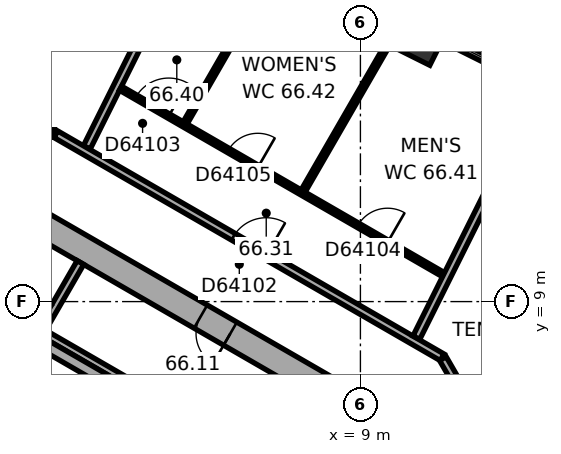
"""IFC4 building model, lengths in metres.
Left out: names, types, materials, properties, quantities, classifications, styles, units other than length and angle.
Written with IfcOpenShell. Run it as: python <this file> out.ifc"""

import sys

from ifc_helpers import new_model, si_unit, direction, frame, frame_2d, origin, origin_2d, place, context, subcontext, project, spatial, rectangle, extrude, element, fill, save


model = new_model("IFC4")
c1 = context("Model", 3, precision=1e-05, world=origin(), true_north=direction((0.0, 1.0)))
c2 = subcontext(c1, "Body", "Model", "MODEL_VIEW")
j1 = project(units=[si_unit("LENGTHUNIT", "METRE"), si_unit("PLANEANGLEUNIT", "RADIAN")], contexts=[c1])
p1 = place(None, origin())
s1 = spatial("IfcSite", under=j1, at=p1, CompositionType="ELEMENT")
p2 = place(p1, origin())
s2 = spatial("IfcBuilding", under=s1, at=p2, CompositionType="ELEMENT")
p3 = place(p2, frame((0.0, 0.0, 267.2)))
s3 = spatial("IfcBuildingStorey", under=s2, at=p3, CompositionType="ELEMENT", Elevation=267.2)
p4 = place(p3, frame((10.58, 15.732, 0.0), z_axis=(0.0, 0.0, 1.0), x_axis=(-0.894934361602, 0.44619781311, 0.0)))
e1 = element("IfcColumn", 1, at=p4, inside=s3, PredefinedType="COLUMN", context=c2, shape_type="SweptSolid", body=[
    extrude(rectangle(XDim=0.9, YDim=0.7, at=origin_2d()), origin(), (0.0, 0.0, 1.0), 3.7),
])
p5 = place(p3, frame((10.025, 5.586, 0.0), z_axis=(0.0, 0.0, 1.0), x_axis=(-0.866026453023, 0.499998182661, 0.0)))
e2 = element("IfcWall", 2, at=p5, inside=s3, PredefinedType="SHEAR", context=c2, shape_type="SweptSolid", body=[
    extrude(rectangle(XDim=11.778, YDim=0.7, at=frame_2d((5.889, 0.0))), origin(), (0.0, 0.0, 1.0), 3.7),
])
p6 = place(p5, frame((5.139, 0.0, 0.0)))
e3 = element("IfcOpeningElement", 3, at=p6, cuts=e2, PredefinedType="OPENING", context=c2, shape_type="SweptSolid", body=[
    extrude(rectangle(XDim=0.9, YDim=2.1, at=frame_2d((0.45, 1.05))), frame((0.0, 0.36, 0.0), z_axis=(0.0, -1.0, 0.0), x_axis=(1.0, 0.0, 0.0)), (0.0, 0.0, 1.0), 0.72),
])
p7 = place(p3, frame((17.223, 12.923, 0.0), z_axis=(0.0, 0.0, 1.0), x_axis=(-0.894930561148, 0.44620543556, 0.0)))
e4 = element("IfcWall", 4, at=p7, inside=s3, PredefinedType="STANDARD", context=c2, shape_type="SweptSolid", body=[
    extrude(rectangle(XDim=17.731, YDim=0.2, at=frame_2d((8.866, 0.0))), origin(), (0.0, 0.0, 1.0), 3.7),
])
p8 = place(p7, frame((1.202, 0.0, 0.9)))
e5 = element("IfcOpeningElement", 5, at=p8, cuts=e4, PredefinedType="OPENING", context=c2, shape_type="SweptSolid", body=[
    extrude(rectangle(XDim=2.0, YDim=2.0, at=frame_2d((1.0, 1.0))), frame((0.0, 0.11, 0.0), z_axis=(0.0, -1.0, 0.0), x_axis=(1.0, 0.0, 0.0)), (0.0, 0.0, 1.0), 0.22),
])
p9 = place(p7, frame((4.533, 0.0, 0.9)))
e6 = element("IfcOpeningElement", 6, at=p9, cuts=e4, PredefinedType="OPENING", context=c2, shape_type="SweptSolid", body=[
    extrude(rectangle(XDim=2.0, YDim=2.0, at=frame_2d((1.0, 1.0))), frame((0.0, 0.11, 0.0), z_axis=(0.0, -1.0, 0.0), x_axis=(1.0, 0.0, 0.0)), (0.0, 0.0, 1.0), 0.22),
])
p10 = place(p7, frame((7.865, 0.0, 0.9)))
e7 = element("IfcOpeningElement", 7, at=p10, cuts=e4, PredefinedType="OPENING", context=c2, shape_type="SweptSolid", body=[
    extrude(rectangle(XDim=2.0, YDim=2.0, at=frame_2d((1.0, 1.0))), frame((0.0, 0.11, 0.0), z_axis=(0.0, -1.0, 0.0), x_axis=(1.0, 0.0, 0.0)), (0.0, 0.0, 1.0), 0.22),
])
p11 = place(p7, frame((11.197, 0.0, 0.9)))
e8 = element("IfcOpeningElement", 8, at=p11, cuts=e4, PredefinedType="OPENING", context=c2, shape_type="SweptSolid", body=[
    extrude(rectangle(XDim=2.0, YDim=2.0, at=frame_2d((1.0, 1.0))), frame((0.0, 0.11, 0.0), z_axis=(0.0, -1.0, 0.0), x_axis=(1.0, 0.0, 0.0)), (0.0, 0.0, 1.0), 0.22),
])
p12 = place(p7, frame((14.528, 0.0, 0.9)))
e9 = element("IfcOpeningElement", 9, at=p12, cuts=e4, PredefinedType="OPENING", context=c2, shape_type="SweptSolid", body=[
    extrude(rectangle(XDim=2.0, YDim=2.0, at=frame_2d((1.0, 1.0))), frame((0.0, 0.11, 0.0), z_axis=(0.0, -1.0, 0.0), x_axis=(1.0, 0.0, 0.0)), (0.0, 0.0, 1.0), 0.22),
])
p13 = place(p3, frame((7.424, 4.259, 0.0), z_axis=(0.0, 0.0, 1.0), x_axis=(-0.866026010844, 0.49999894854, 0.0)))
e10 = element("IfcWall", 10, at=p13, inside=s3, PredefinedType="PARTITIONING", context=c2, shape_type="SweptSolid", body=[
    extrude(rectangle(XDim=8.0, YDim=0.2, at=frame_2d((4.0, 0.0))), origin(), (0.0, 0.0, 1.0), 3.42),
])
p14 = place(p3, frame((0.532, 8.122, 0.0), z_axis=(0.0, 0.0, 1.0), x_axis=(0.500077893725, 0.86598042715, 0.0)))
e11 = element("IfcWall", 11, at=p14, inside=s3, PredefinedType="PARTITIONING", context=c2, shape_type="SweptSolid", body=[
    extrude(rectangle(XDim=2.2, YDim=0.2, at=frame_2d((1.1, 0.0))), origin(), (0.0, 0.0, 1.0), 3.42),
])
p15 = place(p3, frame((6.303, 4.617, 0.0), z_axis=(0.0, 0.0, 1.0), x_axis=(-0.866027801685, 0.499995846692, 0.0)))
e12 = element("IfcWall", 12, at=p15, inside=s3, PredefinedType="SHEAR", context=c2, shape_type="SweptSolid", body=[
    extrude(rectangle(XDim=7.06, YDim=0.3, at=frame_2d((3.53, 0.0))), origin(), (0.0, 0.0, 1.0), 3.42),
])
p16 = place(p3, frame((0.95, 13.423, 0.0), z_axis=(0.0, 0.0, 1.0), x_axis=(-1.0, 0.0, 0.0)))
e13 = element("IfcWall", 13, at=p16, inside=s3, PredefinedType="PARTITIONING", context=c2, shape_type="SweptSolid", body=[
    extrude(rectangle(XDim=1.86, YDim=0.2, at=frame_2d((0.93, 0.0))), origin(), (0.0, 0.0, 1.0), 3.42),
])
p17 = place(p3, frame((4.388, 13.702, 0.0), z_axis=(0.0, 0.0, 1.0), x_axis=(0.500048966069, 0.865997131366, 0.0)))
e14 = element("IfcWall", 14, at=p17, inside=s3, PredefinedType="PARTITIONING", context=c2, shape_type="SweptSolid", body=[
    extrude(rectangle(XDim=2.74, YDim=0.12, at=frame_2d((1.37, 0.0))), origin(), (0.0, 0.0, 1.0), 3.42),
])
p18 = place(p3, frame((4.46, 18.392, 0.0), z_axis=(0.0, 0.0, 1.0), x_axis=(-0.446197360024, -0.894934587502, 0.0)))
e15 = element("IfcWall", 15, at=p18, inside=s3, PredefinedType="PARTITIONING", context=c2, shape_type="SweptSolid", body=[
    extrude(rectangle(XDim=5.96, YDim=0.2, at=frame_2d((2.98, 0.0))), origin(), (0.0, 0.0, 1.0), 2.87),
])
p19 = place(p3, frame((10.072, 16.376, 0.0), z_axis=(0.0, 0.0, 1.0), x_axis=(-0.499972385701, -0.86604134632, 0.0)))
e16 = element("IfcWall", 16, at=p19, inside=s3, PredefinedType="PARTITIONING", context=c2, shape_type="SweptSolid", body=[
    extrude(rectangle(XDim=5.158, YDim=0.12, at=frame_2d((2.579, 0.0))), origin(), (0.0, 0.0, 1.0), 2.87),
])
p20 = place(p3, frame((11.15, 7.534, 0.0), z_axis=(0.0, 0.0, 1.0), x_axis=(-0.866026603062, 0.499997922785, 0.0)))
e17 = element("IfcWall", 17, at=p20, inside=s3, PredefinedType="PARTITIONING", context=c2, shape_type="SweptSolid", body=[
    extrude(rectangle(XDim=11.738, YDim=0.2, at=frame_2d((5.869, 0.0))), origin(), (0.0, 0.0, 1.0), 3.42),
])
p21 = place(p20, frame((5.345, 0.0, 0.0)))
e18 = element("IfcOpeningElement", 18, at=p21, cuts=e17, PredefinedType="OPENING", context=c2, shape_type="SweptSolid", body=[
    extrude(rectangle(XDim=1.0, YDim=2.1, at=frame_2d((0.5, 1.05))), frame((0.0, 0.11, 0.0), z_axis=(0.0, -1.0, 0.0), x_axis=(1.0, 0.0, 0.0)), (0.0, 0.0, 1.0), 0.22),
])
p22 = place(p3, frame((11.187, 9.707, 0.0), z_axis=(0.0, 0.0, 1.0), x_axis=(-0.866033133531, 0.499986611447, 0.0)))
e19 = element("IfcWall", 19, at=p22, inside=s3, PredefinedType="PARTITIONING", context=c2, shape_type="SweptSolid", body=[
    extrude(rectangle(XDim=9.814, YDim=0.12, at=frame_2d((4.907, 0.0))), origin(), (0.0, 0.0, 1.0), 3.42),
])
p23 = place(p22, frame((8.349, 0.0, 0.0)))
e20 = element("IfcOpeningElement", 20, at=p23, cuts=e19, PredefinedType="OPENING", context=c2, shape_type="SweptSolid", body=[
    extrude(rectangle(XDim=1.0, YDim=2.1, at=frame_2d((0.5, 1.05))), frame((0.0, 0.07, 0.0), z_axis=(0.0, -1.0, 0.0), x_axis=(1.0, 0.0, 0.0)), (0.0, 0.0, 1.0), 0.14),
])
p24 = place(p22, frame((1.7, 0.0, 0.0)))
e21 = element("IfcOpeningElement", 21, at=p24, cuts=e19, PredefinedType="OPENING", context=c2, shape_type="SweptSolid", body=[
    extrude(rectangle(XDim=0.9, YDim=2.1, at=frame_2d((0.45, 1.05))), frame((0.0, 0.07, 0.0), z_axis=(0.0, -1.0, 0.0), x_axis=(1.0, 0.0, 0.0)), (0.0, 0.0, 1.0), 0.14),
])
p25 = place(p22, frame((5.642, 0.0, 0.0)))
e22 = element("IfcOpeningElement", 22, at=p25, cuts=e19, PredefinedType="OPENING", context=c2, shape_type="SweptSolid", body=[
    extrude(rectangle(XDim=0.9, YDim=2.1, at=frame_2d((0.45, 1.05))), frame((0.0, 0.07, 0.0), z_axis=(0.0, -1.0, 0.0), x_axis=(1.0, 0.0, 0.0)), (0.0, 0.0, 1.0), 0.14),
])
p26 = place(p3, frame((12.08, 5.924, 0.0), z_axis=(0.0, 0.0, 1.0), x_axis=(-0.500004960326, 0.86602253992, 0.0)))
e23 = element("IfcWall", 23, at=p26, inside=s3, PredefinedType="PARTITIONING", context=c2, shape_type="SweptSolid", body=[
    extrude(rectangle(XDim=1.82, YDim=0.2, at=frame_2d((0.91, 0.0))), origin(), (0.0, 0.0, 1.0), 3.42),
])
p27 = place(p3, frame((13.405, 13.933, 0.0), z_axis=(0.0, 0.0, 1.0), x_axis=(-0.446187838644, -0.894939334618, 0.0)))
e24 = element("IfcWall", 24, at=p27, inside=s3, PredefinedType="PARTITIONING", context=c2, shape_type="SweptSolid", body=[
    extrude(rectangle(XDim=6.571, YDim=0.2, at=frame_2d((3.286, 0.0))), origin(), (0.0, 0.0, 1.0), 3.42),
])
p28 = place(p9, origin())
e25 = element("IfcWindow", 25, at=p28, inside=s3, PartitioningType="SINGLE_PANEL", PredefinedType="WINDOW", context=c2, shape_type="SweptSolid", body=[
    extrude(rectangle(XDim=2.0, YDim=2.0, at=frame_2d((1.0, 1.0))), frame((0.0, 0.03, 0.0), z_axis=(0.0, -1.0, 0.0), x_axis=(1.0, 0.0, 0.0)), (0.0, 0.0, 1.0), 0.06),
])
fill(e6, e25)
p29 = place(p6, origin())
e26 = element("IfcDoor", 26, at=p29, inside=s3, OperationType="SINGLE_SWING_LEFT", PredefinedType="DOOR", context=c2, shape_type="SweptSolid", body=[
    extrude(rectangle(XDim=0.9, YDim=2.1, at=frame_2d((0.45, 1.05))), frame((0.0, 0.025, 0.0), z_axis=(0.0, -1.0, 0.0), x_axis=(1.0, 0.0, 0.0)), (0.0, 0.0, 1.0), 0.05),
])
fill(e3, e26)
p30 = place(p21, origin())
e27 = element("IfcDoor", 27, at=p30, inside=s3, OperationType="SINGLE_SWING_LEFT", PredefinedType="DOOR", context=c2, shape_type="SweptSolid", body=[
    extrude(rectangle(XDim=1.0, YDim=2.1, at=frame_2d((0.5, 1.05))), frame((0.0, 0.025, 0.0), z_axis=(0.0, -1.0, 0.0), x_axis=(1.0, 0.0, 0.0)), (0.0, 0.0, 1.0), 0.05),
])
fill(e18, e27)
p31 = place(p23, origin())
e28 = element("IfcDoor", 28, at=p31, inside=s3, OperationType="SINGLE_SWING_LEFT", PredefinedType="DOOR", context=c2, shape_type="SweptSolid", body=[
    extrude(rectangle(XDim=1.0, YDim=2.1, at=frame_2d((0.5, 1.05))), frame((0.0, 0.025, 0.0), z_axis=(0.0, -1.0, 0.0), x_axis=(1.0, 0.0, 0.0)), (0.0, 0.0, 1.0), 0.05),
])
fill(e20, e28)
p32 = place(p24, origin())
e29 = element("IfcDoor", 29, at=p32, inside=s3, OperationType="SINGLE_SWING_LEFT", PredefinedType="DOOR", context=c2, shape_type="SweptSolid", body=[
    extrude(rectangle(XDim=0.9, YDim=2.1, at=frame_2d((0.45, 1.05))), frame((0.0, 0.025, 0.0), z_axis=(0.0, -1.0, 0.0), x_axis=(1.0, 0.0, 0.0)), (0.0, 0.0, 1.0), 0.05),
])
fill(e21, e29)
p33 = place(p25, origin())
e30 = element("IfcDoor", 30, at=p33, inside=s3, OperationType="SINGLE_SWING_LEFT", PredefinedType="DOOR", context=c2, shape_type="SweptSolid", body=[
    extrude(rectangle(XDim=0.9, YDim=2.1, at=frame_2d((0.45, 1.05))), frame((0.0, 0.025, 0.0), z_axis=(0.0, -1.0, 0.0), x_axis=(1.0, 0.0, 0.0)), (0.0, 0.0, 1.0), 0.05),
])
fill(e22, e30)
save(model, sys.argv[1])
